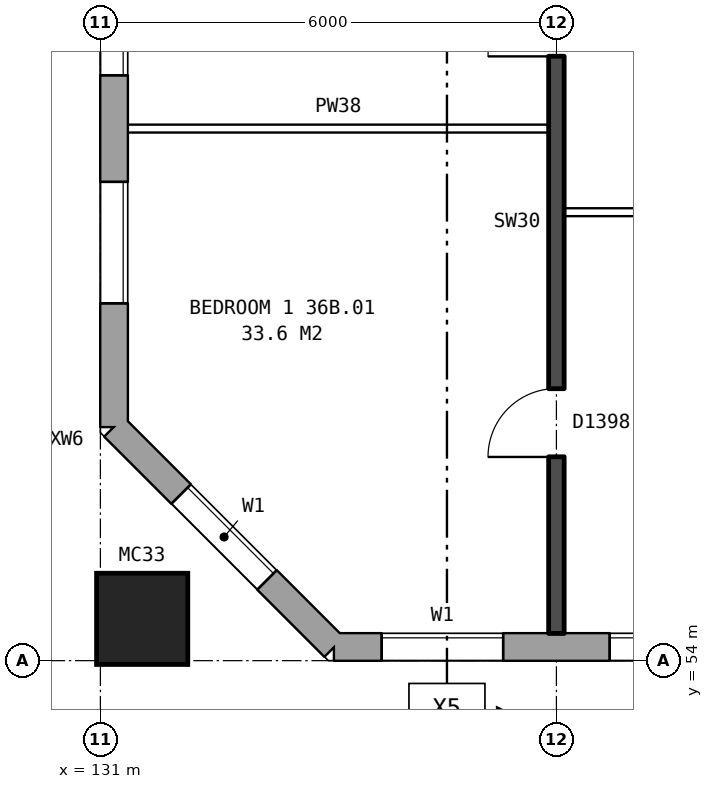
"""IFC4 building model, lengths in metres.
Left out: names, types, materials, properties, quantities, classifications, styles, units other than length and angle.
Written with IfcOpenShell. Run it as: python <this file> out.ifc"""

import sys

from ifc_helpers import new_model, si_unit, direction, frame, frame_2d, origin, origin_2d, place, context, subcontext, project, spatial, rectangle, hollow_rectangle, extrude, element, fill, save


model = new_model("IFC4")
c1 = context("Model", 3, precision=1e-05, world=origin(), true_north=direction((0.0, 1.0)))
c2 = subcontext(c1, "Body", "Model", "MODEL_VIEW")
j1 = project(units=[si_unit("LENGTHUNIT", "METRE"), si_unit("PLANEANGLEUNIT", "RADIAN")], contexts=[c1])
p1 = place(None, origin())
s1 = spatial("IfcSite", under=j1, at=p1, CompositionType="ELEMENT")
p2 = place(p1, origin())
s2 = spatial("IfcBuilding", under=s1, at=p2, CompositionType="ELEMENT")
p3 = place(p2, frame((0.0, 0.0, 129.9)))
s3 = spatial("IfcBuildingStorey", under=s2, at=p3, CompositionType="ELEMENT", Elevation=129.9)
p4 = place(p3, frame((131.55, 54.55, 0.0), z_axis=(0.0, 0.0, 1.0), x_axis=(1.0, 0.0, 0.0)))
e1 = element("IfcColumn", 1, at=p4, inside=s3, PredefinedType="COLUMN", context=c2, shape_type="SweptSolid", body=[
    extrude(hollow_rectangle(XDim=1.2, YDim=1.2, WallThickness=0.065, at=origin_2d()), origin(), (0.0, 0.0, 1.0), 3.1),
])
p5 = place(p3, frame((131.18, 57.075, 0.0), z_axis=(0.0, 0.0, 1.0), x_axis=(0.707106781187, -0.707106781187, 0.0)))
e2 = element("IfcWall", 2, at=p5, inside=s3, PredefinedType="STANDARD", context=c2, shape_type="SweptSolid", body=[
    extrude(rectangle(XDim=4.094, YDim=0.36, at=frame_2d((2.047, 0.0))), origin(), (0.0, 0.0, 1.0), 2.85),
])
p6 = place(p5, frame((1.247, 0.0, 0.8)))
e3 = element("IfcOpeningElement", 3, at=p6, cuts=e2, PredefinedType="OPENING", context=c2, shape_type="SweptSolid", body=[
    extrude(rectangle(XDim=1.6, YDim=1.8, at=frame_2d((0.8, 0.9))), frame((0.0, 0.19, 0.0), z_axis=(0.0, -1.0, 0.0), x_axis=(1.0, 0.0, 0.0)), (0.0, 0.0, 1.0), 0.38),
])
p7 = place(p3, frame((134.075, 54.18, 0.0), z_axis=(0.0, 0.0, 1.0), x_axis=(1.0, 0.0, 0.0)))
e4 = element("IfcWall", 4, at=p7, inside=s3, PredefinedType="STANDARD", context=c2, shape_type="SweptSolid", body=[
    extrude(rectangle(XDim=35.601, YDim=0.36, at=frame_2d((17.8, 0.0))), origin(), (0.0, 0.0, 1.0), 2.85),
])
p8 = place(p7, frame((0.625, 0.0, 0.8)))
e5 = element("IfcOpeningElement", 5, at=p8, cuts=e4, PredefinedType="OPENING", context=c2, shape_type="SweptSolid", body=[
    extrude(rectangle(XDim=1.6, YDim=1.8, at=frame_2d((0.8, 0.9))), frame((0.0, 0.19, 0.0), z_axis=(0.0, -1.0, 0.0), x_axis=(1.0, 0.0, 0.0)), (0.0, 0.0, 1.0), 0.38),
])
p9 = place(p7, frame((3.625, 0.0, 0.8)))
e6 = element("IfcOpeningElement", 6, at=p9, cuts=e4, PredefinedType="OPENING", context=c2, shape_type="SweptSolid", body=[
    extrude(rectangle(XDim=1.6, YDim=1.8, at=frame_2d((0.8, 0.9))), frame((0.0, 0.19, 0.0), z_axis=(0.0, -1.0, 0.0), x_axis=(1.0, 0.0, 0.0)), (0.0, 0.0, 1.0), 0.38),
])
p10 = place(p7, frame((5.525, 0.0, 0.8)))
e7 = element("IfcOpeningElement", 7, at=p10, cuts=e4, PredefinedType="OPENING", context=c2, shape_type="SweptSolid", body=[
    extrude(rectangle(XDim=1.2, YDim=1.8, at=frame_2d((0.6, 0.9))), frame((0.0, 0.19, 0.0), z_axis=(0.0, -1.0, 0.0), x_axis=(1.0, 0.0, 0.0)), (0.0, 0.0, 1.0), 0.38),
])
p11 = place(p7, frame((9.625, 0.0, 0.8)))
e8 = element("IfcOpeningElement", 8, at=p11, cuts=e4, PredefinedType="OPENING", context=c2, shape_type="SweptSolid", body=[
    extrude(rectangle(XDim=1.6, YDim=1.8, at=frame_2d((0.8, 0.9))), frame((0.0, 0.19, 0.0), z_axis=(0.0, -1.0, 0.0), x_axis=(1.0, 0.0, 0.0)), (0.0, 0.0, 1.0), 0.38),
])
p12 = place(p7, frame((12.625, 0.0, 0.8)))
e9 = element("IfcOpeningElement", 9, at=p12, cuts=e4, PredefinedType="OPENING", context=c2, shape_type="SweptSolid", body=[
    extrude(rectangle(XDim=1.6, YDim=1.8, at=frame_2d((0.8, 0.9))), frame((0.0, 0.19, 0.0), z_axis=(0.0, -1.0, 0.0), x_axis=(1.0, 0.0, 0.0)), (0.0, 0.0, 1.0), 0.38),
])
p13 = place(p7, frame((15.625, 0.0, 0.8)))
e10 = element("IfcOpeningElement", 10, at=p13, cuts=e4, PredefinedType="OPENING", context=c2, shape_type="SweptSolid", body=[
    extrude(rectangle(XDim=1.6, YDim=1.8, at=frame_2d((0.8, 0.9))), frame((0.0, 0.19, 0.0), z_axis=(0.0, -1.0, 0.0), x_axis=(1.0, 0.0, 0.0)), (0.0, 0.0, 1.0), 0.38),
])
p14 = place(p7, frame((18.625, 0.0, 0.8)))
e11 = element("IfcOpeningElement", 11, at=p14, cuts=e4, PredefinedType="OPENING", context=c2, shape_type="SweptSolid", body=[
    extrude(rectangle(XDim=1.6, YDim=1.8, at=frame_2d((0.8, 0.9))), frame((0.0, 0.19, 0.0), z_axis=(0.0, -1.0, 0.0), x_axis=(1.0, 0.0, 0.0)), (0.0, 0.0, 1.0), 0.38),
])
p15 = place(p7, frame((21.625, 0.0, 0.8)))
e12 = element("IfcOpeningElement", 12, at=p15, cuts=e4, PredefinedType="OPENING", context=c2, shape_type="SweptSolid", body=[
    extrude(rectangle(XDim=1.6, YDim=1.8, at=frame_2d((0.8, 0.9))), frame((0.0, 0.19, 0.0), z_axis=(0.0, -1.0, 0.0), x_axis=(1.0, 0.0, 0.0)), (0.0, 0.0, 1.0), 0.38),
])
p16 = place(p7, frame((24.625, 0.0, 0.8)))
e13 = element("IfcOpeningElement", 13, at=p16, cuts=e4, PredefinedType="OPENING", context=c2, shape_type="SweptSolid", body=[
    extrude(rectangle(XDim=1.6, YDim=1.8, at=frame_2d((0.8, 0.9))), frame((0.0, 0.19, 0.0), z_axis=(0.0, -1.0, 0.0), x_axis=(1.0, 0.0, 0.0)), (0.0, 0.0, 1.0), 0.38),
])
p17 = place(p7, frame((27.825, 0.0, 1.7)))
e14 = element("IfcOpeningElement", 14, at=p17, cuts=e4, PredefinedType="OPENING", context=c2, shape_type="SweptSolid", body=[
    extrude(rectangle(XDim=0.6, YDim=0.9, at=frame_2d((0.3, 0.45))), frame((0.0, 0.19, 0.0), z_axis=(0.0, -1.0, 0.0), x_axis=(1.0, 0.0, 0.0)), (0.0, 0.0, 1.0), 0.38),
])
p18 = place(p7, frame((30.625, 0.0, 0.8)))
e15 = element("IfcOpeningElement", 15, at=p18, cuts=e4, PredefinedType="OPENING", context=c2, shape_type="SweptSolid", body=[
    extrude(rectangle(XDim=1.6, YDim=1.8, at=frame_2d((0.8, 0.9))), frame((0.0, 0.19, 0.0), z_axis=(0.0, -1.0, 0.0), x_axis=(1.0, 0.0, 0.0)), (0.0, 0.0, 1.0), 0.38),
])
p19 = place(p7, frame((33.625, 0.0, 0.8)))
e16 = element("IfcOpeningElement", 16, at=p19, cuts=e4, PredefinedType="OPENING", context=c2, shape_type="SweptSolid", body=[
    extrude(rectangle(XDim=1.6, YDim=1.8, at=frame_2d((0.8, 0.9))), frame((0.0, 0.19, 0.0), z_axis=(0.0, -1.0, 0.0), x_axis=(1.0, 0.0, 0.0)), (0.0, 0.0, 1.0), 0.38),
])
p20 = place(p7, frame((7.025, 0.0, 1.6)))
e17 = element("IfcOpeningElement", 17, at=p20, cuts=e4, PredefinedType="OPENING", context=c2, shape_type="SweptSolid", body=[
    extrude(rectangle(XDim=0.6, YDim=0.9, at=frame_2d((0.3, 0.45))), frame((0.0, 0.19, 0.0), z_axis=(0.0, -1.0, 0.0), x_axis=(1.0, 0.0, 0.0)), (0.0, 0.0, 1.0), 0.38),
])
p21 = place(p7, frame((28.725, 0.0, 0.8)))
e18 = element("IfcOpeningElement", 18, at=p21, cuts=e4, PredefinedType="OPENING", context=c2, shape_type="SweptSolid", body=[
    extrude(rectangle(XDim=1.6, YDim=1.8, at=frame_2d((0.8, 0.9))), frame((0.0, 0.19, 0.0), z_axis=(0.0, -1.0, 0.0), x_axis=(1.0, 0.0, 0.0)), (0.0, 0.0, 1.0), 0.38),
])
p22 = place(p3, frame((131.18, 82.925, 0.0), z_axis=(0.0, 0.0, 1.0), x_axis=(0.0, -1.0, 0.0)))
e19 = element("IfcWall", 19, at=p22, inside=s3, PredefinedType="STANDARD", context=c2, shape_type="SweptSolid", body=[
    extrude(rectangle(XDim=25.851, YDim=0.36, at=frame_2d((12.925, 0.0))), origin(), (0.0, 0.0, 1.0), 2.85),
])
p23 = place(p22, frame((1.625, 0.0, 0.8)))
e20 = element("IfcOpeningElement", 20, at=p23, cuts=e19, PredefinedType="OPENING", context=c2, shape_type="SweptSolid", body=[
    extrude(rectangle(XDim=1.6, YDim=1.8, at=frame_2d((0.8, 0.9))), frame((0.0, 0.19, 0.0), z_axis=(0.0, -1.0, 0.0), x_axis=(1.0, 0.0, 0.0)), (0.0, 0.0, 1.0), 0.38),
])
p24 = place(p22, frame((4.625, 0.0, 0.8)))
e21 = element("IfcOpeningElement", 21, at=p24, cuts=e19, PredefinedType="OPENING", context=c2, shape_type="SweptSolid", body=[
    extrude(rectangle(XDim=1.6, YDim=1.8, at=frame_2d((0.8, 0.9))), frame((0.0, 0.19, 0.0), z_axis=(0.0, -1.0, 0.0), x_axis=(1.0, 0.0, 0.0)), (0.0, 0.0, 1.0), 0.38),
])
p25 = place(p22, frame((19.625, 0.0, 0.8)))
e22 = element("IfcOpeningElement", 22, at=p25, cuts=e19, PredefinedType="OPENING", context=c2, shape_type="SweptSolid", body=[
    extrude(rectangle(XDim=1.6, YDim=1.8, at=frame_2d((0.8, 0.9))), frame((0.0, 0.19, 0.0), z_axis=(0.0, -1.0, 0.0), x_axis=(1.0, 0.0, 0.0)), (0.0, 0.0, 1.0), 0.38),
])
p26 = place(p22, frame((22.625, 0.0, 0.8)))
e23 = element("IfcOpeningElement", 23, at=p26, cuts=e19, PredefinedType="OPENING", context=c2, shape_type="SweptSolid", body=[
    extrude(rectangle(XDim=1.6, YDim=1.8, at=frame_2d((0.8, 0.9))), frame((0.0, 0.19, 0.0), z_axis=(0.0, -1.0, 0.0), x_axis=(1.0, 0.0, 0.0)), (0.0, 0.0, 1.0), 0.38),
])
p27 = place(p3, frame((137.1, 59.9, 0.0), z_axis=(0.0, 0.0, 1.0), x_axis=(1.0, 0.0, 0.0)))
e24 = element("IfcWall", 24, at=p27, inside=s3, PredefinedType="PARTITIONING", context=c2, shape_type="SweptSolid", body=[
    extrude(rectangle(XDim=5.8, YDim=0.1, at=frame_2d((2.9, 0.0))), origin(), (0.0, 0.0, 1.0), 2.85),
])
p28 = place(p27, frame((1.3, 0.0, 0.0)))
e25 = element("IfcOpeningElement", 25, at=p28, cuts=e24, PredefinedType="OPENING", context=c2, shape_type="SweptSolid", body=[
    extrude(rectangle(XDim=0.9, YDim=2.1, at=frame_2d((0.45, 1.05))), frame((0.0, 0.06, 0.0), z_axis=(0.0, -1.0, 0.0), x_axis=(1.0, 0.0, 0.0)), (0.0, 0.0, 1.0), 0.12),
])
p29 = place(p27, frame((4.2, 0.0, 0.0)))
e26 = element("IfcOpeningElement", 26, at=p29, cuts=e24, PredefinedType="OPENING", context=c2, shape_type="SweptSolid", body=[
    extrude(rectangle(XDim=0.9, YDim=2.1, at=frame_2d((0.45, 1.05))), frame((0.0, 0.06, 0.0), z_axis=(0.0, -1.0, 0.0), x_axis=(1.0, 0.0, 0.0)), (0.0, 0.0, 1.0), 0.12),
])
p30 = place(p3, frame((131.36, 61.0, 0.0), z_axis=(0.0, 0.0, 1.0), x_axis=(1.0, 0.0, 0.0)))
e27 = element("IfcWall", 27, at=p30, inside=s3, PredefinedType="PARTITIONING", context=c2, shape_type="SweptSolid", body=[
    extrude(rectangle(XDim=5.54, YDim=0.1, at=frame_2d((2.77, 0.0))), origin(), (0.0, 0.0, 1.0), 2.85),
])
p31 = place(p3, frame((137.0, 54.36, 0.0), z_axis=(0.0, 0.0, 1.0), x_axis=(0.0, 1.0, 0.0)))
e28 = element("IfcWall", 28, at=p31, inside=s3, PredefinedType="SOLIDWALL", context=c2, shape_type="SweptSolid", body=[
    extrude(rectangle(XDim=9.44, YDim=0.2, at=frame_2d((4.72, 0.0))), origin(), (0.0, 0.0, 1.0), 2.85),
])
p32 = place(p31, frame((2.32, 0.0, 0.0)))
e29 = element("IfcOpeningElement", 29, at=p32, cuts=e28, PredefinedType="OPENING", context=c2, shape_type="SweptSolid", body=[
    extrude(rectangle(XDim=0.9, YDim=2.1, at=frame_2d((0.45, 1.05))), frame((0.0, 0.11, 0.0), z_axis=(0.0, -1.0, 0.0), x_axis=(1.0, 0.0, 0.0)), (0.0, 0.0, 1.0), 0.22),
])
p33 = place(p31, frame((7.59, 0.0, 0.0)))
e30 = element("IfcOpeningElement", 30, at=p33, cuts=e28, PredefinedType="OPENING", context=c2, shape_type="SweptSolid", body=[
    extrude(rectangle(XDim=0.9, YDim=2.1, at=frame_2d((0.45, 1.05))), frame((0.0, 0.11, 0.0), z_axis=(0.0, -1.0, 0.0), x_axis=(1.0, 0.0, 0.0)), (0.0, 0.0, 1.0), 0.22),
])
p34 = place(p6, origin())
e31 = element("IfcWindow", 31, at=p34, inside=s3, PartitioningType="SINGLE_PANEL", PredefinedType="WINDOW", context=c2, shape_type="SweptSolid", body=[
    extrude(rectangle(XDim=1.6, YDim=1.8, at=frame_2d((0.8, 0.9))), frame((0.0, 0.15, 0.0), z_axis=(0.0, -1.0, 0.0), x_axis=(1.0, 0.0, 0.0)), (0.0, 0.0, 1.0), 0.06),
])
fill(e3, e31)
p35 = place(p8, origin())
e32 = element("IfcWindow", 32, at=p35, inside=s3, PartitioningType="SINGLE_PANEL", PredefinedType="WINDOW", context=c2, shape_type="SweptSolid", body=[
    extrude(rectangle(XDim=1.6, YDim=1.8, at=frame_2d((0.8, 0.9))), frame((0.0, 0.15, 0.0), z_axis=(0.0, -1.0, 0.0), x_axis=(1.0, 0.0, 0.0)), (0.0, 0.0, 1.0), 0.06),
])
fill(e5, e32)
p36 = place(p9, origin())
e33 = element("IfcWindow", 33, at=p36, inside=s3, PartitioningType="SINGLE_PANEL", PredefinedType="WINDOW", context=c2, shape_type="SweptSolid", body=[
    extrude(rectangle(XDim=1.6, YDim=1.8, at=frame_2d((0.8, 0.9))), frame((0.0, 0.15, 0.0), z_axis=(0.0, -1.0, 0.0), x_axis=(1.0, 0.0, 0.0)), (0.0, 0.0, 1.0), 0.06),
])
fill(e6, e33)
p37 = place(p25, origin())
e34 = element("IfcWindow", 34, at=p37, inside=s3, PartitioningType="SINGLE_PANEL", PredefinedType="WINDOW", context=c2, shape_type="SweptSolid", body=[
    extrude(rectangle(XDim=1.6, YDim=1.8, at=frame_2d((0.8, 0.9))), frame((0.0, 0.15, 0.0), z_axis=(0.0, -1.0, 0.0), x_axis=(1.0, 0.0, 0.0)), (0.0, 0.0, 1.0), 0.06),
])
fill(e22, e34)
p38 = place(p26, origin())
e35 = element("IfcWindow", 35, at=p38, inside=s3, PartitioningType="SINGLE_PANEL", PredefinedType="WINDOW", context=c2, shape_type="SweptSolid", body=[
    extrude(rectangle(XDim=1.6, YDim=1.8, at=frame_2d((0.8, 0.9))), frame((0.0, 0.15, 0.0), z_axis=(0.0, -1.0, 0.0), x_axis=(1.0, 0.0, 0.0)), (0.0, 0.0, 1.0), 0.06),
])
fill(e23, e35)
p39 = place(p32, origin())
e36 = element("IfcDoor", 36, at=p39, inside=s3, OperationType="SINGLE_SWING_LEFT", PredefinedType="DOOR", context=c2, shape_type="SweptSolid", body=[
    extrude(rectangle(XDim=0.9, YDim=2.1, at=frame_2d((0.45, 1.05))), frame((0.0, 0.025, 0.0), z_axis=(0.0, -1.0, 0.0), x_axis=(1.0, 0.0, 0.0)), (0.0, 0.0, 1.0), 0.05),
])
fill(e29, e36)
p40 = place(p33, origin())
e37 = element("IfcDoor", 37, at=p40, inside=s3, OperationType="SINGLE_SWING_LEFT", PredefinedType="DOOR", context=c2, shape_type="SweptSolid", body=[
    extrude(rectangle(XDim=0.9, YDim=2.1, at=frame_2d((0.45, 1.05))), frame((0.0, 0.025, 0.0), z_axis=(0.0, -1.0, 0.0), x_axis=(1.0, 0.0, 0.0)), (0.0, 0.0, 1.0), 0.05),
])
fill(e30, e37)
save(model, sys.argv[1])
